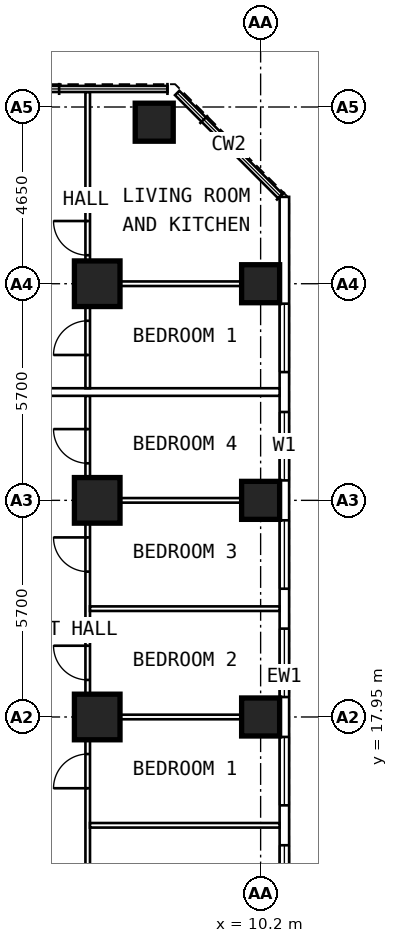
"""IFC4 building model, lengths in metres.
Left out: names, types, materials, properties, quantities, classifications, styles, units other than length and angle.
Written with IfcOpenShell. Run it as: python <this file> out.ifc"""

import sys

from ifc_helpers import new_model, si_unit, direction, frame, frame_2d, origin, origin_2d, place, context, subcontext, project, spatial, rectangle, extrude, element, fill, save


model = new_model("IFC4")
c1 = context("Model", 3, precision=1e-05, world=origin(), true_north=direction((0.0, 1.0)))
c2 = subcontext(c1, "Body", "Model", "MODEL_VIEW")
j1 = project(units=[si_unit("LENGTHUNIT", "METRE"), si_unit("PLANEANGLEUNIT", "RADIAN")], contexts=[c1])
p1 = place(None, origin())
s1 = spatial("IfcSite", under=j1, at=p1, CompositionType="ELEMENT")
p2 = place(p1, origin())
s2 = spatial("IfcBuilding", under=s1, at=p2, CompositionType="ELEMENT")
p3 = place(p2, frame((0.0, 0.0, 53.8)))
s3 = spatial("IfcBuildingStorey", under=s2, at=p3, CompositionType="ELEMENT", Elevation=53.8)
for number, where, z_axis, x_axis in (
    (1, (10.2, 17.95, 0.0), (0.0, 0.0, 1.0), (0.0, 1.0, 0.0)),
    (2, (10.2, 23.65, 0.0), (0.0, 0.0, 1.0), (0.0, 1.0, 0.0)),
    (3, (10.2, 29.35, 0.0), (0.0, 0.0, 1.0), (0.0, 1.0, 0.0)),
    (4, (7.4, 33.6, 0.0), (0.0, 0.0, 1.0), (0.0, 1.0, 0.0)),
):
    element("IfcColumn", number, at=place(p3, frame(where, z_axis=z_axis, x_axis=x_axis)), inside=s3, PredefinedType="COLUMN", context=c2, shape_type="SweptSolid", body=[
        extrude(rectangle(XDim=1.0, YDim=1.0, at=origin_2d()), origin(), (0.0, 0.0, 1.0), 3.6),
    ])
for number, where, z_axis, x_axis in (
    (5, (5.9, 17.95, 0.0), (0.0, 0.0, 1.0), (0.0, 1.0, 0.0)),
    (6, (5.9, 23.65, 0.0), (0.0, 0.0, 1.0), (0.0, 1.0, 0.0)),
    (7, (5.9, 29.35, 0.0), (0.0, 0.0, 1.0), (0.0, 1.0, 0.0)),
):
    element("IfcColumn", number, at=place(p3, frame(where, z_axis=z_axis, x_axis=x_axis)), inside=s3, PredefinedType="COLUMN", context=c2, shape_type="SweptSolid", body=[
        extrude(rectangle(XDim=1.2, YDim=1.2, at=origin_2d()), origin(), (0.0, 0.0, 1.0), 3.6),
    ])
p4 = place(p3, frame((10.825, 6.394, 0.0), z_axis=(0.0, 0.0, 1.0), x_axis=(0.0, 1.0, 0.0)))
e8 = element("IfcWall", 8, at=p4, inside=s3, PredefinedType="SOLIDWALL", context=c2, shape_type="SweptSolid", body=[
    extrude(rectangle(XDim=25.241, YDim=0.25, at=frame_2d((12.621, 0.0))), origin(), (0.0, 0.0, 1.0), 3.35),
])
p5 = place(p4, frame((0.681, 0.0, 0.8)))
e9 = element("IfcOpeningElement", 9, at=p5, cuts=e8, PredefinedType="OPENING", context=c2, shape_type="SweptSolid", body=[
    extrude(rectangle(XDim=1.8, YDim=1.8, at=frame_2d((0.9, 0.9))), frame((0.0, 0.137, 0.0), z_axis=(0.0, -1.0, 0.0), x_axis=(1.0, 0.0, 0.0)), (0.0, 0.0, 1.0), 0.274),
])
p6 = place(p4, frame((3.531, 0.0, 0.8)))
e10 = element("IfcOpeningElement", 10, at=p6, cuts=e8, PredefinedType="OPENING", context=c2, shape_type="SweptSolid", body=[
    extrude(rectangle(XDim=1.8, YDim=1.8, at=frame_2d((0.9, 0.9))), frame((0.0, 0.137, 0.0), z_axis=(0.0, -1.0, 0.0), x_axis=(1.0, 0.0, 0.0)), (0.0, 0.0, 1.0), 0.274),
])
p7 = place(p4, frame((6.381, 0.0, 0.8)))
e11 = element("IfcOpeningElement", 11, at=p7, cuts=e8, PredefinedType="OPENING", context=c2, shape_type="SweptSolid", body=[
    extrude(rectangle(XDim=1.8, YDim=1.8, at=frame_2d((0.9, 0.9))), frame((0.0, 0.137, 0.0), z_axis=(0.0, -1.0, 0.0), x_axis=(1.0, 0.0, 0.0)), (0.0, 0.0, 1.0), 0.274),
])
p8 = place(p4, frame((9.231, 0.0, 0.8)))
e12 = element("IfcOpeningElement", 12, at=p8, cuts=e8, PredefinedType="OPENING", context=c2, shape_type="SweptSolid", body=[
    extrude(rectangle(XDim=1.8, YDim=1.8, at=frame_2d((0.9, 0.9))), frame((0.0, 0.137, 0.0), z_axis=(0.0, -1.0, 0.0), x_axis=(1.0, 0.0, 0.0)), (0.0, 0.0, 1.0), 0.274),
])
p9 = place(p4, frame((12.081, 0.0, 0.8)))
e13 = element("IfcOpeningElement", 13, at=p9, cuts=e8, PredefinedType="OPENING", context=c2, shape_type="SweptSolid", body=[
    extrude(rectangle(XDim=1.8, YDim=1.8, at=frame_2d((0.9, 0.9))), frame((0.0, 0.137, 0.0), z_axis=(0.0, -1.0, 0.0), x_axis=(1.0, 0.0, 0.0)), (0.0, 0.0, 1.0), 0.274),
])
p10 = place(p4, frame((14.931, 0.0, 0.8)))
e14 = element("IfcOpeningElement", 14, at=p10, cuts=e8, PredefinedType="OPENING", context=c2, shape_type="SweptSolid", body=[
    extrude(rectangle(XDim=1.8, YDim=1.8, at=frame_2d((0.9, 0.9))), frame((0.0, 0.137, 0.0), z_axis=(0.0, -1.0, 0.0), x_axis=(1.0, 0.0, 0.0)), (0.0, 0.0, 1.0), 0.274),
])
p11 = place(p4, frame((17.781, 0.0, 0.8)))
e15 = element("IfcOpeningElement", 15, at=p11, cuts=e8, PredefinedType="OPENING", context=c2, shape_type="SweptSolid", body=[
    extrude(rectangle(XDim=1.8, YDim=1.8, at=frame_2d((0.9, 0.9))), frame((0.0, 0.137, 0.0), z_axis=(0.0, -1.0, 0.0), x_axis=(1.0, 0.0, 0.0)), (0.0, 0.0, 1.0), 0.274),
])
p12 = place(p4, frame((20.631, 0.0, 0.8)))
e16 = element("IfcOpeningElement", 16, at=p12, cuts=e8, PredefinedType="OPENING", context=c2, shape_type="SweptSolid", body=[
    extrude(rectangle(XDim=1.8, YDim=1.8, at=frame_2d((0.9, 0.9))), frame((0.0, 0.137, 0.0), z_axis=(0.0, -1.0, 0.0), x_axis=(1.0, 0.0, 0.0)), (0.0, 0.0, 1.0), 0.274),
])
p13 = place(p3, frame((5.65, 9.6, 0.0), z_axis=(0.0, 0.0, 1.0), x_axis=(0.0, 1.0, 0.0)))
e17 = element("IfcWall", 17, at=p13, inside=s3, PredefinedType="PARTITIONING", context=c2, shape_type="SweptSolid", body=[
    extrude(rectangle(XDim=16.8, YDim=0.12, at=frame_2d((8.4, 0.0))), origin(), (0.0, 0.0, 1.0), 3.35),
])
p14 = place(p13, frame((3.4, 0.0, 0.0)))
e18 = element("IfcOpeningElement", 18, at=p14, cuts=e17, PredefinedType="OPENING", context=c2, shape_type="SweptSolid", body=[
    extrude(rectangle(XDim=0.9, YDim=2.1, at=frame_2d((0.45, 1.05))), frame((0.0, 0.072, 0.0), z_axis=(0.0, -1.0, 0.0), x_axis=(1.0, 0.0, 0.0)), (0.0, 0.0, 1.0), 0.144),
])
p15 = place(p13, frame((6.475, 0.0, 0.0)))
e19 = element("IfcOpeningElement", 19, at=p15, cuts=e17, PredefinedType="OPENING", context=c2, shape_type="SweptSolid", body=[
    extrude(rectangle(XDim=0.9, YDim=2.1, at=frame_2d((0.45, 1.05))), frame((0.0, 0.072, 0.0), z_axis=(0.0, -1.0, 0.0), x_axis=(1.0, 0.0, 0.0)), (0.0, 0.0, 1.0), 0.144),
])
p16 = place(p13, frame((9.325, 0.0, 0.0)))
e20 = element("IfcOpeningElement", 20, at=p16, cuts=e17, PredefinedType="OPENING", context=c2, shape_type="SweptSolid", body=[
    extrude(rectangle(XDim=0.9, YDim=2.1, at=frame_2d((0.45, 1.05))), frame((0.0, 0.072, 0.0), z_axis=(0.0, -1.0, 0.0), x_axis=(1.0, 0.0, 0.0)), (0.0, 0.0, 1.0), 0.144),
])
p17 = place(p13, frame((12.175, 0.0, 0.0)))
e21 = element("IfcOpeningElement", 21, at=p17, cuts=e17, PredefinedType="OPENING", context=c2, shape_type="SweptSolid", body=[
    extrude(rectangle(XDim=0.9, YDim=2.1, at=frame_2d((0.45, 1.05))), frame((0.0, 0.072, 0.0), z_axis=(0.0, -1.0, 0.0), x_axis=(1.0, 0.0, 0.0)), (0.0, 0.0, 1.0), 0.144),
])
p18 = place(p13, frame((15.025, 0.0, 0.0)))
e22 = element("IfcOpeningElement", 22, at=p18, cuts=e17, PredefinedType="OPENING", context=c2, shape_type="SweptSolid", body=[
    extrude(rectangle(XDim=0.9, YDim=2.1, at=frame_2d((0.45, 1.05))), frame((0.0, 0.072, 0.0), z_axis=(0.0, -1.0, 0.0), x_axis=(1.0, 0.0, 0.0)), (0.0, 0.0, 1.0), 0.144),
])
p19 = place(p3, frame((5.71, 15.1, 0.0), z_axis=(0.0, 0.0, 1.0), x_axis=(1.0, 0.0, 0.0)))
e23 = element("IfcWall", 23, at=p19, inside=s3, PredefinedType="PARTITIONING", context=c2, shape_type="SweptSolid", body=[
    extrude(rectangle(XDim=4.99, YDim=0.12, at=frame_2d((2.495, 0.0))), origin(), (0.0, 0.0, 1.0), 3.35),
])
p20 = place(p3, frame((5.71, 17.95, 0.0), z_axis=(0.0, 0.0, 1.0), x_axis=(1.0, 0.0, 0.0)))
e24 = element("IfcWall", 24, at=p20, inside=s3, PredefinedType="PARTITIONING", context=c2, shape_type="SweptSolid", body=[
    extrude(rectangle(XDim=4.99, YDim=0.12, at=frame_2d((2.495, 0.0))), origin(), (0.0, 0.0, 1.0), 2.45),
])
p21 = place(p3, frame((5.71, 20.8, 0.0), z_axis=(0.0, 0.0, 1.0), x_axis=(1.0, 0.0, 0.0)))
e25 = element("IfcWall", 25, at=p21, inside=s3, PredefinedType="PARTITIONING", context=c2, shape_type="SweptSolid", body=[
    extrude(rectangle(XDim=4.99, YDim=0.12, at=frame_2d((2.495, 0.0))), origin(), (0.0, 0.0, 1.0), 3.35),
])
p22 = place(p3, frame((5.71, 23.65, 0.0), z_axis=(0.0, 0.0, 1.0), x_axis=(1.0, 0.0, 0.0)))
e26 = element("IfcWall", 26, at=p22, inside=s3, PredefinedType="PARTITIONING", context=c2, shape_type="SweptSolid", body=[
    extrude(rectangle(XDim=4.99, YDim=0.12, at=frame_2d((2.495, 0.0))), origin(), (0.0, 0.0, 1.0), 2.45),
])
p23 = place(p3, frame((5.65, 26.6, 0.0), z_axis=(0.0, 0.0, 1.0), x_axis=(0.0, 1.0, 0.0)))
e27 = element("IfcWall", 27, at=p23, inside=s3, PredefinedType="PARTITIONING", context=c2, shape_type="SweptSolid", body=[
    extrude(rectangle(XDim=7.795, YDim=0.12, at=frame_2d((3.897, 0.0))), origin(), (0.0, 0.0, 1.0), 3.35),
])
p24 = place(p23, frame((0.875, 0.0, 0.0)))
e28 = element("IfcOpeningElement", 28, at=p24, cuts=e27, PredefinedType="OPENING", context=c2, shape_type="SweptSolid", body=[
    extrude(rectangle(XDim=0.9, YDim=2.1, at=frame_2d((0.45, 1.05))), frame((0.0, 0.072, 0.0), z_axis=(0.0, -1.0, 0.0), x_axis=(1.0, 0.0, 0.0)), (0.0, 0.0, 1.0), 0.144),
])
p25 = place(p23, frame((3.5, 0.0, 0.0)))
e29 = element("IfcOpeningElement", 29, at=p25, cuts=e27, PredefinedType="OPENING", context=c2, shape_type="SweptSolid", body=[
    extrude(rectangle(XDim=0.9, YDim=2.1, at=frame_2d((0.45, 1.05))), frame((0.0, 0.072, 0.0), z_axis=(0.0, -1.0, 0.0), x_axis=(1.0, 0.0, 0.0)), (0.0, 0.0, 1.0), 0.144),
])
p26 = place(p3, frame((5.71, 29.35, 0.0), z_axis=(0.0, 0.0, 1.0), x_axis=(1.0, 0.0, 0.0)))
e30 = element("IfcWall", 30, at=p26, inside=s3, PredefinedType="PARTITIONING", context=c2, shape_type="SweptSolid", body=[
    extrude(rectangle(XDim=4.99, YDim=0.12, at=frame_2d((2.495, 0.0))), origin(), (0.0, 0.0, 1.0), 2.45),
])
p27 = place(p3, frame((2.1, 26.5, 0.0), z_axis=(0.0, 0.0, 1.0), x_axis=(1.0, 0.0, 0.0)))
e31 = element("IfcWall", 31, at=p27, inside=s3, PredefinedType="PARTITIONING", context=c2, shape_type="SweptSolid", body=[
    extrude(rectangle(XDim=8.6, YDim=0.2, at=frame_2d((4.3, 0.0))), origin(), (0.0, 0.0, 1.0), 3.35),
])
p28 = place(p7, origin())
e32 = element("IfcWindow", 32, at=p28, inside=s3, PartitioningType="SINGLE_PANEL", PredefinedType="WINDOW", context=c2, shape_type="SweptSolid", body=[
    extrude(rectangle(XDim=1.8, YDim=1.8, at=frame_2d((0.9, 0.9))), frame((0.0, 0.03, 0.0), z_axis=(0.0, -1.0, 0.0), x_axis=(1.0, 0.0, 0.0)), (0.0, 0.0, 1.0), 0.06),
])
fill(e11, e32)
p29 = place(p8, origin())
e33 = element("IfcWindow", 33, at=p29, inside=s3, PartitioningType="SINGLE_PANEL", PredefinedType="WINDOW", context=c2, shape_type="SweptSolid", body=[
    extrude(rectangle(XDim=1.8, YDim=1.8, at=frame_2d((0.9, 0.9))), frame((0.0, 0.03, 0.0), z_axis=(0.0, -1.0, 0.0), x_axis=(1.0, 0.0, 0.0)), (0.0, 0.0, 1.0), 0.06),
])
fill(e12, e33)
p30 = place(p9, origin())
e34 = element("IfcWindow", 34, at=p30, inside=s3, PartitioningType="SINGLE_PANEL", PredefinedType="WINDOW", context=c2, shape_type="SweptSolid", body=[
    extrude(rectangle(XDim=1.8, YDim=1.8, at=frame_2d((0.9, 0.9))), frame((0.0, 0.03, 0.0), z_axis=(0.0, -1.0, 0.0), x_axis=(1.0, 0.0, 0.0)), (0.0, 0.0, 1.0), 0.06),
])
fill(e13, e34)
p31 = place(p10, origin())
e35 = element("IfcWindow", 35, at=p31, inside=s3, PartitioningType="SINGLE_PANEL", PredefinedType="WINDOW", context=c2, shape_type="SweptSolid", body=[
    extrude(rectangle(XDim=1.8, YDim=1.8, at=frame_2d((0.9, 0.9))), frame((0.0, 0.03, 0.0), z_axis=(0.0, -1.0, 0.0), x_axis=(1.0, 0.0, 0.0)), (0.0, 0.0, 1.0), 0.06),
])
fill(e14, e35)
p32 = place(p11, origin())
e36 = element("IfcWindow", 36, at=p32, inside=s3, PartitioningType="SINGLE_PANEL", PredefinedType="WINDOW", context=c2, shape_type="SweptSolid", body=[
    extrude(rectangle(XDim=1.8, YDim=1.8, at=frame_2d((0.9, 0.9))), frame((0.0, 0.03, 0.0), z_axis=(0.0, -1.0, 0.0), x_axis=(1.0, 0.0, 0.0)), (0.0, 0.0, 1.0), 0.06),
])
fill(e15, e36)
p33 = place(p12, origin())
e37 = element("IfcWindow", 37, at=p33, inside=s3, PartitioningType="SINGLE_PANEL", PredefinedType="WINDOW", context=c2, shape_type="SweptSolid", body=[
    extrude(rectangle(XDim=1.8, YDim=1.8, at=frame_2d((0.9, 0.9))), frame((0.0, 0.03, 0.0), z_axis=(0.0, -1.0, 0.0), x_axis=(1.0, 0.0, 0.0)), (0.0, 0.0, 1.0), 0.06),
])
fill(e16, e37)
p34 = place(p15, origin())
e38 = element("IfcDoor", 38, at=p34, inside=s3, OperationType="SINGLE_SWING_LEFT", PredefinedType="DOOR", context=c2, shape_type="SweptSolid", body=[
    extrude(rectangle(XDim=0.9, YDim=2.1, at=frame_2d((0.45, 1.05))), frame((0.0, 0.025, 0.0), z_axis=(0.0, -1.0, 0.0), x_axis=(1.0, 0.0, 0.0)), (0.0, 0.0, 1.0), 0.05),
])
fill(e19, e38)
p35 = place(p16, origin())
e39 = element("IfcDoor", 39, at=p35, inside=s3, OperationType="SINGLE_SWING_RIGHT", PredefinedType="DOOR", context=c2, shape_type="SweptSolid", body=[
    extrude(rectangle(XDim=0.9, YDim=2.1, at=frame_2d((0.45, 1.05))), frame((0.0, 0.025, 0.0), z_axis=(0.0, -1.0, 0.0), x_axis=(1.0, 0.0, 0.0)), (0.0, 0.0, 1.0), 0.05),
])
fill(e20, e39)
p36 = place(p17, origin())
e40 = element("IfcDoor", 40, at=p36, inside=s3, OperationType="SINGLE_SWING_RIGHT", PredefinedType="DOOR", context=c2, shape_type="SweptSolid", body=[
    extrude(rectangle(XDim=0.9, YDim=2.1, at=frame_2d((0.45, 1.05))), frame((0.0, 0.025, 0.0), z_axis=(0.0, -1.0, 0.0), x_axis=(1.0, 0.0, 0.0)), (0.0, 0.0, 1.0), 0.05),
])
fill(e21, e40)
p37 = place(p18, origin())
e41 = element("IfcDoor", 41, at=p37, inside=s3, OperationType="SINGLE_SWING_RIGHT", PredefinedType="DOOR", context=c2, shape_type="SweptSolid", body=[
    extrude(rectangle(XDim=0.9, YDim=2.1, at=frame_2d((0.45, 1.05))), frame((0.0, 0.025, 0.0), z_axis=(0.0, -1.0, 0.0), x_axis=(1.0, 0.0, 0.0)), (0.0, 0.0, 1.0), 0.05),
])
fill(e22, e41)
p38 = place(p24, origin())
e42 = element("IfcDoor", 42, at=p38, inside=s3, OperationType="SINGLE_SWING_LEFT", PredefinedType="DOOR", context=c2, shape_type="SweptSolid", body=[
    extrude(rectangle(XDim=0.9, YDim=2.1, at=frame_2d((0.45, 1.05))), frame((0.0, 0.025, 0.0), z_axis=(0.0, -1.0, 0.0), x_axis=(1.0, 0.0, 0.0)), (0.0, 0.0, 1.0), 0.05),
])
fill(e28, e42)
p39 = place(p25, origin())
e43 = element("IfcDoor", 43, at=p39, inside=s3, OperationType="SINGLE_SWING_RIGHT", PredefinedType="DOOR", context=c2, shape_type="SweptSolid", body=[
    extrude(rectangle(XDim=0.9, YDim=2.1, at=frame_2d((0.45, 1.05))), frame((0.0, 0.025, 0.0), z_axis=(0.0, -1.0, 0.0), x_axis=(1.0, 0.0, 0.0)), (0.0, 0.0, 1.0), 0.05),
])
fill(e29, e43)
save(model, sys.argv[1])
